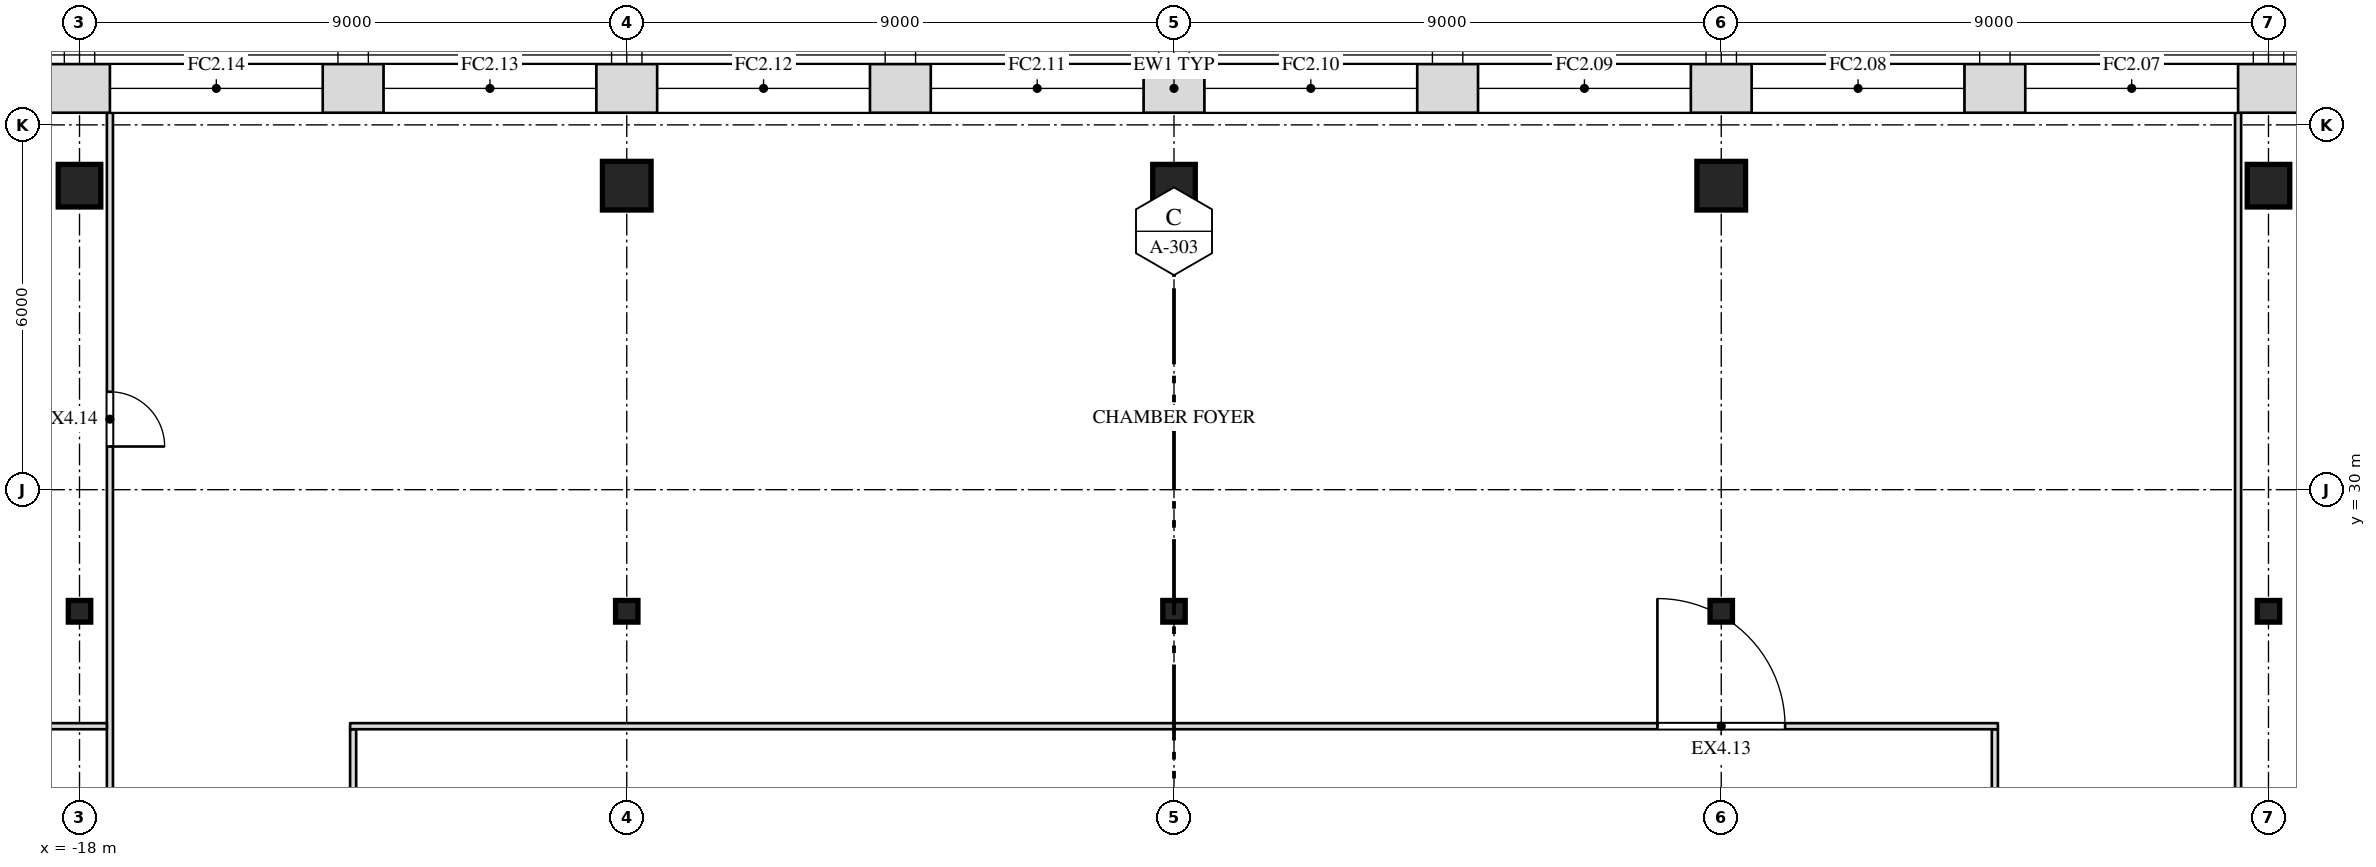
"""IFC4 building model, lengths in metres.
Left out: names, types, materials, properties, quantities, classifications, styles, units other than length and angle.
Written with IfcOpenShell. Run it as: python <this file> out.ifc"""

import sys

from ifc_helpers import new_model, si_unit, direction, frame, frame_2d, origin, origin_2d, place, context, subcontext, project, spatial, rectangle, i_section, extrude, element, fill, save


model = new_model("IFC4")
c1 = context("Model", 3, precision=1e-05, world=origin(), true_north=direction((0.0, 1.0)))
c2 = subcontext(c1, "Body", "Model", "MODEL_VIEW")
j1 = project(units=[si_unit("LENGTHUNIT", "METRE"), si_unit("PLANEANGLEUNIT", "RADIAN")], contexts=[c1])
p1 = place(None, origin())
s1 = spatial("IfcSite", under=j1, at=p1, CompositionType="ELEMENT")
p2 = place(p1, origin())
s2 = spatial("IfcBuilding", under=s1, at=p2, CompositionType="ELEMENT")
p3 = place(p2, frame((0.0, 0.0, 284.5)))
s3 = spatial("IfcBuildingStorey", under=s2, at=p3, CompositionType="ELEMENT", Elevation=284.5)
for number, where, z_axis, x_axis in (
    (1, (-18.0, 28.0, 0.0), (0.0, 0.0, 1.0), (1.0, 0.0, 0.0)),
    (2, (-9.0, 28.0, 0.0), (0.0, 0.0, 1.0), (1.0, 0.0, 0.0)),
    (3, (0.0, 28.0, 0.0), (0.0, 0.0, 1.0), (1.0, 0.0, 0.0)),
    (4, (9.0, 28.0, 0.0), (0.0, 0.0, 1.0), (1.0, 0.0, 0.0)),
    (5, (18.0, 28.0, 0.0), (0.0, 0.0, 1.0), (1.0, 0.0, 0.0)),
):
    element("IfcColumn", number, at=place(p3, frame(where, z_axis=z_axis, x_axis=x_axis)), inside=s3, PredefinedType="COLUMN", context=c2, shape_type="SweptSolid", body=[
        extrude(i_section(OverallWidth=0.368, OverallDepth=0.356, WebThickness=0.011, FlangeThickness=0.018, at=origin_2d()), origin(), (0.0, 0.0, 1.0), 4.0),
    ])
p4 = place(p3, frame((-18.0, 35.0, 0.0), z_axis=(0.0, 0.0, 1.0), x_axis=(1.0, 0.0, 0.0)))
e6 = element("IfcColumn", 6, at=p4, inside=s3, PredefinedType="COLUMN", context=c2, shape_type="SweptSolid", body=[
    extrude(rectangle(XDim=0.7, YDim=0.7, at=origin_2d()), origin(), (0.0, 0.0, 1.0), 4.0),
])
p5 = place(p3, frame((-9.0, 35.0, 0.0), z_axis=(0.0, 0.0, 1.0), x_axis=(1.0, 0.0, 0.0)))
e7 = element("IfcColumn", 7, at=p5, inside=s3, PredefinedType="COLUMN", context=c2, shape_type="SweptSolid", body=[
    extrude(rectangle(XDim=0.8, YDim=0.8, at=origin_2d()), origin(), (0.0, 0.0, 1.0), 4.0),
])
p6 = place(p3, frame((0.0, 35.0, 0.0), z_axis=(0.0, 0.0, 1.0), x_axis=(1.0, 0.0, 0.0)))
e8 = element("IfcColumn", 8, at=p6, inside=s3, PredefinedType="COLUMN", context=c2, shape_type="SweptSolid", body=[
    extrude(rectangle(XDim=0.7, YDim=0.7, at=origin_2d()), origin(), (0.0, 0.0, 1.0), 4.0),
])
p7 = place(p3, frame((9.0, 35.0, 0.0), z_axis=(0.0, 0.0, 1.0), x_axis=(1.0, 0.0, 0.0)))
e9 = element("IfcColumn", 9, at=p7, inside=s3, PredefinedType="COLUMN", context=c2, shape_type="SweptSolid", body=[
    extrude(rectangle(XDim=0.8, YDim=0.8, at=origin_2d()), origin(), (0.0, 0.0, 1.0), 4.0),
])
p8 = place(p3, frame((18.0, 35.0, 0.0), z_axis=(0.0, 0.0, 1.0), x_axis=(1.0, 0.0, 0.0)))
e10 = element("IfcColumn", 10, at=p8, inside=s3, PredefinedType="COLUMN", context=c2, shape_type="SweptSolid", body=[
    extrude(rectangle(XDim=0.7, YDim=0.7, at=origin_2d()), origin(), (0.0, 0.0, 1.0), 4.0),
])
p9 = place(p3, frame((-17.5, 6.68, 0.0), z_axis=(0.0, 0.0, 1.0), x_axis=(0.0, 1.0, 0.0)))
e11 = element("IfcWall", 11, at=p9, inside=s3, PredefinedType="PARTITIONING", context=c2, shape_type="SweptSolid", body=[
    extrude(rectangle(XDim=29.52, YDim=0.1, at=frame_2d((14.76, 0.0))), origin(), (0.0, 0.0, 1.0), 3.78),
])
p10 = place(p9, frame((5.92, 0.0, 0.0)))
e12 = element("IfcOpeningElement", 12, at=p10, cuts=e11, PredefinedType="OPENING", context=c2, shape_type="SweptSolid", body=[
    extrude(rectangle(XDim=0.9, YDim=2.1, at=frame_2d((0.45, 1.05))), frame((0.0, 0.062, 0.0), z_axis=(0.0, -1.0, 0.0), x_axis=(1.0, 0.0, 0.0)), (0.0, 0.0, 1.0), 0.124),
])
p11 = place(p9, frame((13.04, 0.0, 0.0)))
e13 = element("IfcOpeningElement", 13, at=p11, cuts=e11, PredefinedType="OPENING", context=c2, shape_type="SweptSolid", body=[
    extrude(rectangle(XDim=1.8, YDim=2.1, at=frame_2d((0.9, 1.05))), frame((0.0, 0.062, 0.0), z_axis=(0.0, -1.0, 0.0), x_axis=(1.0, 0.0, 0.0)), (0.0, 0.0, 1.0), 0.124),
])
p12 = place(p9, frame((24.03, 0.0, 0.0)))
e14 = element("IfcOpeningElement", 14, at=p12, cuts=e11, PredefinedType="OPENING", context=c2, shape_type="SweptSolid", body=[
    extrude(rectangle(XDim=0.9, YDim=2.1, at=frame_2d((0.45, 1.05))), frame((0.0, 0.062, 0.0), z_axis=(0.0, -1.0, 0.0), x_axis=(1.0, 0.0, 0.0)), (0.0, 0.0, 1.0), 0.124),
])
p13 = place(p3, frame((17.5, 6.68, 0.0), z_axis=(0.0, 0.0, 1.0), x_axis=(0.0, 1.0, 0.0)))
e15 = element("IfcWall", 15, at=p13, inside=s3, PredefinedType="PARTITIONING", context=c2, shape_type="SweptSolid", body=[
    extrude(rectangle(XDim=29.52, YDim=0.1, at=frame_2d((14.76, 0.0))), origin(), (0.0, 0.0, 1.0), 3.78),
])
p14 = place(p13, frame((9.22, 0.0, 0.0)))
e16 = element("IfcOpeningElement", 16, at=p14, cuts=e15, PredefinedType="OPENING", context=c2, shape_type="SweptSolid", body=[
    extrude(rectangle(XDim=0.9, YDim=2.1, at=frame_2d((0.45, 1.05))), frame((0.0, 0.062, 0.0), z_axis=(0.0, -1.0, 0.0), x_axis=(1.0, 0.0, 0.0)), (0.0, 0.0, 1.0), 0.124),
])
p15 = place(p13, frame((16.56, 0.0, 0.0)))
e17 = element("IfcOpeningElement", 17, at=p15, cuts=e15, PredefinedType="OPENING", context=c2, shape_type="SweptSolid", body=[
    extrude(rectangle(XDim=0.9, YDim=2.1, at=frame_2d((0.45, 1.05))), frame((0.0, 0.062, 0.0), z_axis=(0.0, -1.0, 0.0), x_axis=(1.0, 0.0, 0.0)), (0.0, 0.0, 1.0), 0.124),
])
p16 = place(p3, frame((-13.5, 11.55, 0.0), z_axis=(0.0, 0.0, 1.0), x_axis=(0.0, 1.0, 0.0)))
e18 = element("IfcWall", 18, at=p16, inside=s3, PredefinedType="PARTITIONING", context=c2, shape_type="SweptSolid", body=[
    extrude(rectangle(XDim=14.51, YDim=0.1, at=frame_2d((7.255, 0.0))), origin(), (0.0, 0.0, 1.0), 3.247),
])
p17 = place(p16, frame((8.4, 0.0, 0.0)))
e19 = element("IfcOpeningElement", 19, at=p17, cuts=e18, PredefinedType="OPENING", context=c2, shape_type="SweptSolid", body=[
    extrude(rectangle(XDim=2.1, YDim=2.4, at=frame_2d((1.05, 1.2))), frame((0.0, 0.062, 0.0), z_axis=(0.0, -1.0, 0.0), x_axis=(1.0, 0.0, 0.0)), (0.0, 0.0, 1.0), 0.124),
])
p18 = place(p3, frame((13.5, 11.55, 0.0), z_axis=(0.0, 0.0, 1.0), x_axis=(0.0, 1.0, 0.0)))
e20 = element("IfcWall", 20, at=p18, inside=s3, PredefinedType="PARTITIONING", context=c2, shape_type="SweptSolid", body=[
    extrude(rectangle(XDim=14.51, YDim=0.1, at=frame_2d((7.255, 0.0))), origin(), (0.0, 0.0, 1.0), 3.247),
])
p19 = place(p18, frame((8.4, 0.0, 0.0)))
e21 = element("IfcOpeningElement", 21, at=p19, cuts=e20, PredefinedType="OPENING", context=c2, shape_type="SweptSolid", body=[
    extrude(rectangle(XDim=2.1, YDim=2.4, at=frame_2d((1.05, 1.2))), frame((0.0, 0.062, 0.0), z_axis=(0.0, -1.0, 0.0), x_axis=(1.0, 0.0, 0.0)), (0.0, 0.0, 1.0), 0.124),
])
p20 = place(p3, frame((-32.2, 26.11, 0.0), z_axis=(0.0, 0.0, 1.0), x_axis=(1.0, 0.0, 0.0)))
e22 = element("IfcWall", 22, at=p20, inside=s3, PredefinedType="PARTITIONING", context=c2, shape_type="SweptSolid", body=[
    extrude(rectangle(XDim=14.65, YDim=0.1, at=frame_2d((7.325, 0.0))), origin(), (0.0, 0.0, 1.0), 3.78),
])
p21 = place(p3, frame((-13.55, 26.11, 0.0), z_axis=(0.0, 0.0, 1.0), x_axis=(1.0, 0.0, 0.0)))
e23 = element("IfcWall", 23, at=p21, inside=s3, PredefinedType="PARTITIONING", context=c2, shape_type="SweptSolid", body=[
    extrude(rectangle(XDim=27.1, YDim=0.1, at=frame_2d((13.55, 0.0))), origin(), (0.0, 0.0, 1.0), 3.78),
])
p22 = place(p21, frame((21.5, 0.0, 0.0)))
e24 = element("IfcOpeningElement", 24, at=p22, cuts=e23, PredefinedType="OPENING", context=c2, shape_type="SweptSolid", body=[
    extrude(rectangle(XDim=2.1, YDim=2.4, at=frame_2d((1.05, 1.2))), frame((0.0, 0.062, 0.0), z_axis=(0.0, -1.0, 0.0), x_axis=(1.0, 0.0, 0.0)), (0.0, 0.0, 1.0), 0.124),
])
p23 = place(p3, frame((26.948, 36.6, 0.0), z_axis=(0.0, 0.0, 1.0), x_axis=(-1.0, 0.0, 0.0)))
e25 = element("IfcWall", 25, at=p23, inside=s3, PredefinedType="SOLIDWALL", context=c2, shape_type="SweptSolid", body=[
    extrude(rectangle(XDim=53.895, YDim=0.8, at=frame_2d((26.948, 0.0))), origin(), (0.0, 0.0, 1.0), 3.78),
])
p24 = place(p23, frame((4.948, 0.0, 1.0)))
e26 = element("IfcOpeningElement", 26, at=p24, cuts=e25, PredefinedType="OPENING", context=c2, shape_type="SweptSolid", body=[
    extrude(rectangle(XDim=3.5, YDim=2.5, at=frame_2d((1.75, 1.25))), frame((0.0, 0.412, 0.0), z_axis=(0.0, -1.0, 0.0), x_axis=(1.0, 0.0, 0.0)), (0.0, 0.0, 1.0), 0.824),
])
p25 = place(p23, frame((9.448, 0.0, 1.0)))
e27 = element("IfcOpeningElement", 27, at=p25, cuts=e25, PredefinedType="OPENING", context=c2, shape_type="SweptSolid", body=[
    extrude(rectangle(XDim=3.5, YDim=2.5, at=frame_2d((1.75, 1.25))), frame((0.0, 0.412, 0.0), z_axis=(0.0, -1.0, 0.0), x_axis=(1.0, 0.0, 0.0)), (0.0, 0.0, 1.0), 0.824),
])
p26 = place(p23, frame((13.948, 0.0, 1.0)))
e28 = element("IfcOpeningElement", 28, at=p26, cuts=e25, PredefinedType="OPENING", context=c2, shape_type="SweptSolid", body=[
    extrude(rectangle(XDim=3.5, YDim=2.5, at=frame_2d((1.75, 1.25))), frame((0.0, 0.412, 0.0), z_axis=(0.0, -1.0, 0.0), x_axis=(1.0, 0.0, 0.0)), (0.0, 0.0, 1.0), 0.824),
])
p27 = place(p23, frame((18.448, 0.0, 1.0)))
e29 = element("IfcOpeningElement", 29, at=p27, cuts=e25, PredefinedType="OPENING", context=c2, shape_type="SweptSolid", body=[
    extrude(rectangle(XDim=3.5, YDim=2.5, at=frame_2d((1.75, 1.25))), frame((0.0, 0.412, 0.0), z_axis=(0.0, -1.0, 0.0), x_axis=(1.0, 0.0, 0.0)), (0.0, 0.0, 1.0), 0.824),
])
p28 = place(p23, frame((22.948, 0.0, 1.0)))
e30 = element("IfcOpeningElement", 30, at=p28, cuts=e25, PredefinedType="OPENING", context=c2, shape_type="SweptSolid", body=[
    extrude(rectangle(XDim=3.5, YDim=2.5, at=frame_2d((1.75, 1.25))), frame((0.0, 0.412, 0.0), z_axis=(0.0, -1.0, 0.0), x_axis=(1.0, 0.0, 0.0)), (0.0, 0.0, 1.0), 0.824),
])
p29 = place(p23, frame((27.448, 0.0, 1.0)))
e31 = element("IfcOpeningElement", 31, at=p29, cuts=e25, PredefinedType="OPENING", context=c2, shape_type="SweptSolid", body=[
    extrude(rectangle(XDim=3.5, YDim=2.5, at=frame_2d((1.75, 1.25))), frame((0.0, 0.412, 0.0), z_axis=(0.0, -1.0, 0.0), x_axis=(1.0, 0.0, 0.0)), (0.0, 0.0, 1.0), 0.824),
])
p30 = place(p23, frame((31.948, 0.0, 1.0)))
e32 = element("IfcOpeningElement", 32, at=p30, cuts=e25, PredefinedType="OPENING", context=c2, shape_type="SweptSolid", body=[
    extrude(rectangle(XDim=3.5, YDim=2.5, at=frame_2d((1.75, 1.25))), frame((0.0, 0.412, 0.0), z_axis=(0.0, -1.0, 0.0), x_axis=(1.0, 0.0, 0.0)), (0.0, 0.0, 1.0), 0.824),
])
p31 = place(p23, frame((36.448, 0.0, 1.0)))
e33 = element("IfcOpeningElement", 33, at=p31, cuts=e25, PredefinedType="OPENING", context=c2, shape_type="SweptSolid", body=[
    extrude(rectangle(XDim=3.5, YDim=2.5, at=frame_2d((1.75, 1.25))), frame((0.0, 0.412, 0.0), z_axis=(0.0, -1.0, 0.0), x_axis=(1.0, 0.0, 0.0)), (0.0, 0.0, 1.0), 0.824),
])
p32 = place(p23, frame((40.948, 0.0, 1.0)))
e34 = element("IfcOpeningElement", 34, at=p32, cuts=e25, PredefinedType="OPENING", context=c2, shape_type="SweptSolid", body=[
    extrude(rectangle(XDim=3.5, YDim=2.5, at=frame_2d((1.75, 1.25))), frame((0.0, 0.412, 0.0), z_axis=(0.0, -1.0, 0.0), x_axis=(1.0, 0.0, 0.0)), (0.0, 0.0, 1.0), 0.824),
])
p33 = place(p23, frame((45.448, 0.0, 1.0)))
e35 = element("IfcOpeningElement", 35, at=p33, cuts=e25, PredefinedType="OPENING", context=c2, shape_type="SweptSolid", body=[
    extrude(rectangle(XDim=3.5, YDim=2.5, at=frame_2d((1.75, 1.25))), frame((0.0, 0.412, 0.0), z_axis=(0.0, -1.0, 0.0), x_axis=(1.0, 0.0, 0.0)), (0.0, 0.0, 1.0), 0.824),
])
p34 = place(p22, origin())
e36 = element("IfcDoor", 36, at=p34, inside=s3, OperationType="DOUBLE_DOOR_SINGLE_SWING", PredefinedType="DOOR", context=c2, shape_type="SweptSolid", body=[
    extrude(rectangle(XDim=2.1, YDim=2.4, at=frame_2d((1.05, 1.2))), frame((0.0, 0.025, 0.0), z_axis=(0.0, -1.0, 0.0), x_axis=(1.0, 0.0, 0.0)), (0.0, 0.0, 1.0), 0.05),
])
fill(e24, e36)
p35 = place(p12, origin())
e37 = element("IfcDoor", 37, at=p35, inside=s3, OperationType="SINGLE_SWING_RIGHT", PredefinedType="DOOR", context=c2, shape_type="SweptSolid", body=[
    extrude(rectangle(XDim=0.9, YDim=2.1, at=frame_2d((0.45, 1.05))), frame((0.0, 0.025, 0.0), z_axis=(0.0, -1.0, 0.0), x_axis=(1.0, 0.0, 0.0)), (0.0, 0.0, 1.0), 0.05),
])
fill(e14, e37)
p36 = place(p25, origin())
e38 = element("IfcWindow", 38, at=p36, inside=s3, PartitioningType="SINGLE_PANEL", PredefinedType="WINDOW", context=c2, shape_type="SweptSolid", body=[
    extrude(rectangle(XDim=3.5, YDim=2.5, at=frame_2d((1.75, 1.25))), frame((0.0, 0.03, 0.0), z_axis=(0.0, -1.0, 0.0), x_axis=(1.0, 0.0, 0.0)), (0.0, 0.0, 1.0), 0.06),
])
fill(e27, e38)
p37 = place(p26, origin())
e39 = element("IfcWindow", 39, at=p37, inside=s3, PartitioningType="SINGLE_PANEL", PredefinedType="WINDOW", context=c2, shape_type="SweptSolid", body=[
    extrude(rectangle(XDim=3.5, YDim=2.5, at=frame_2d((1.75, 1.25))), frame((0.0, 0.03, 0.0), z_axis=(0.0, -1.0, 0.0), x_axis=(1.0, 0.0, 0.0)), (0.0, 0.0, 1.0), 0.06),
])
fill(e28, e39)
p38 = place(p27, origin())
e40 = element("IfcWindow", 40, at=p38, inside=s3, PartitioningType="SINGLE_PANEL", PredefinedType="WINDOW", context=c2, shape_type="SweptSolid", body=[
    extrude(rectangle(XDim=3.5, YDim=2.5, at=frame_2d((1.75, 1.25))), frame((0.0, 0.03, 0.0), z_axis=(0.0, -1.0, 0.0), x_axis=(1.0, 0.0, 0.0)), (0.0, 0.0, 1.0), 0.06),
])
fill(e29, e40)
p39 = place(p28, origin())
e41 = element("IfcWindow", 41, at=p39, inside=s3, PartitioningType="SINGLE_PANEL", PredefinedType="WINDOW", context=c2, shape_type="SweptSolid", body=[
    extrude(rectangle(XDim=3.5, YDim=2.5, at=frame_2d((1.75, 1.25))), frame((0.0, 0.03, 0.0), z_axis=(0.0, -1.0, 0.0), x_axis=(1.0, 0.0, 0.0)), (0.0, 0.0, 1.0), 0.06),
])
fill(e30, e41)
p40 = place(p29, origin())
e42 = element("IfcWindow", 42, at=p40, inside=s3, PartitioningType="SINGLE_PANEL", PredefinedType="WINDOW", context=c2, shape_type="SweptSolid", body=[
    extrude(rectangle(XDim=3.5, YDim=2.5, at=frame_2d((1.75, 1.25))), frame((0.0, 0.03, 0.0), z_axis=(0.0, -1.0, 0.0), x_axis=(1.0, 0.0, 0.0)), (0.0, 0.0, 1.0), 0.06),
])
fill(e31, e42)
p41 = place(p30, origin())
e43 = element("IfcWindow", 43, at=p41, inside=s3, PartitioningType="SINGLE_PANEL", PredefinedType="WINDOW", context=c2, shape_type="SweptSolid", body=[
    extrude(rectangle(XDim=3.5, YDim=2.5, at=frame_2d((1.75, 1.25))), frame((0.0, 0.03, 0.0), z_axis=(0.0, -1.0, 0.0), x_axis=(1.0, 0.0, 0.0)), (0.0, 0.0, 1.0), 0.06),
])
fill(e32, e43)
p42 = place(p31, origin())
e44 = element("IfcWindow", 44, at=p42, inside=s3, PartitioningType="SINGLE_PANEL", PredefinedType="WINDOW", context=c2, shape_type="SweptSolid", body=[
    extrude(rectangle(XDim=3.5, YDim=2.5, at=frame_2d((1.75, 1.25))), frame((0.0, 0.03, 0.0), z_axis=(0.0, -1.0, 0.0), x_axis=(1.0, 0.0, 0.0)), (0.0, 0.0, 1.0), 0.06),
])
fill(e33, e44)
p43 = place(p32, origin())
e45 = element("IfcWindow", 45, at=p43, inside=s3, PartitioningType="SINGLE_PANEL", PredefinedType="WINDOW", context=c2, shape_type="SweptSolid", body=[
    extrude(rectangle(XDim=3.5, YDim=2.5, at=frame_2d((1.75, 1.25))), frame((0.0, 0.03, 0.0), z_axis=(0.0, -1.0, 0.0), x_axis=(1.0, 0.0, 0.0)), (0.0, 0.0, 1.0), 0.06),
])
fill(e34, e45)
save(model, sys.argv[1])
